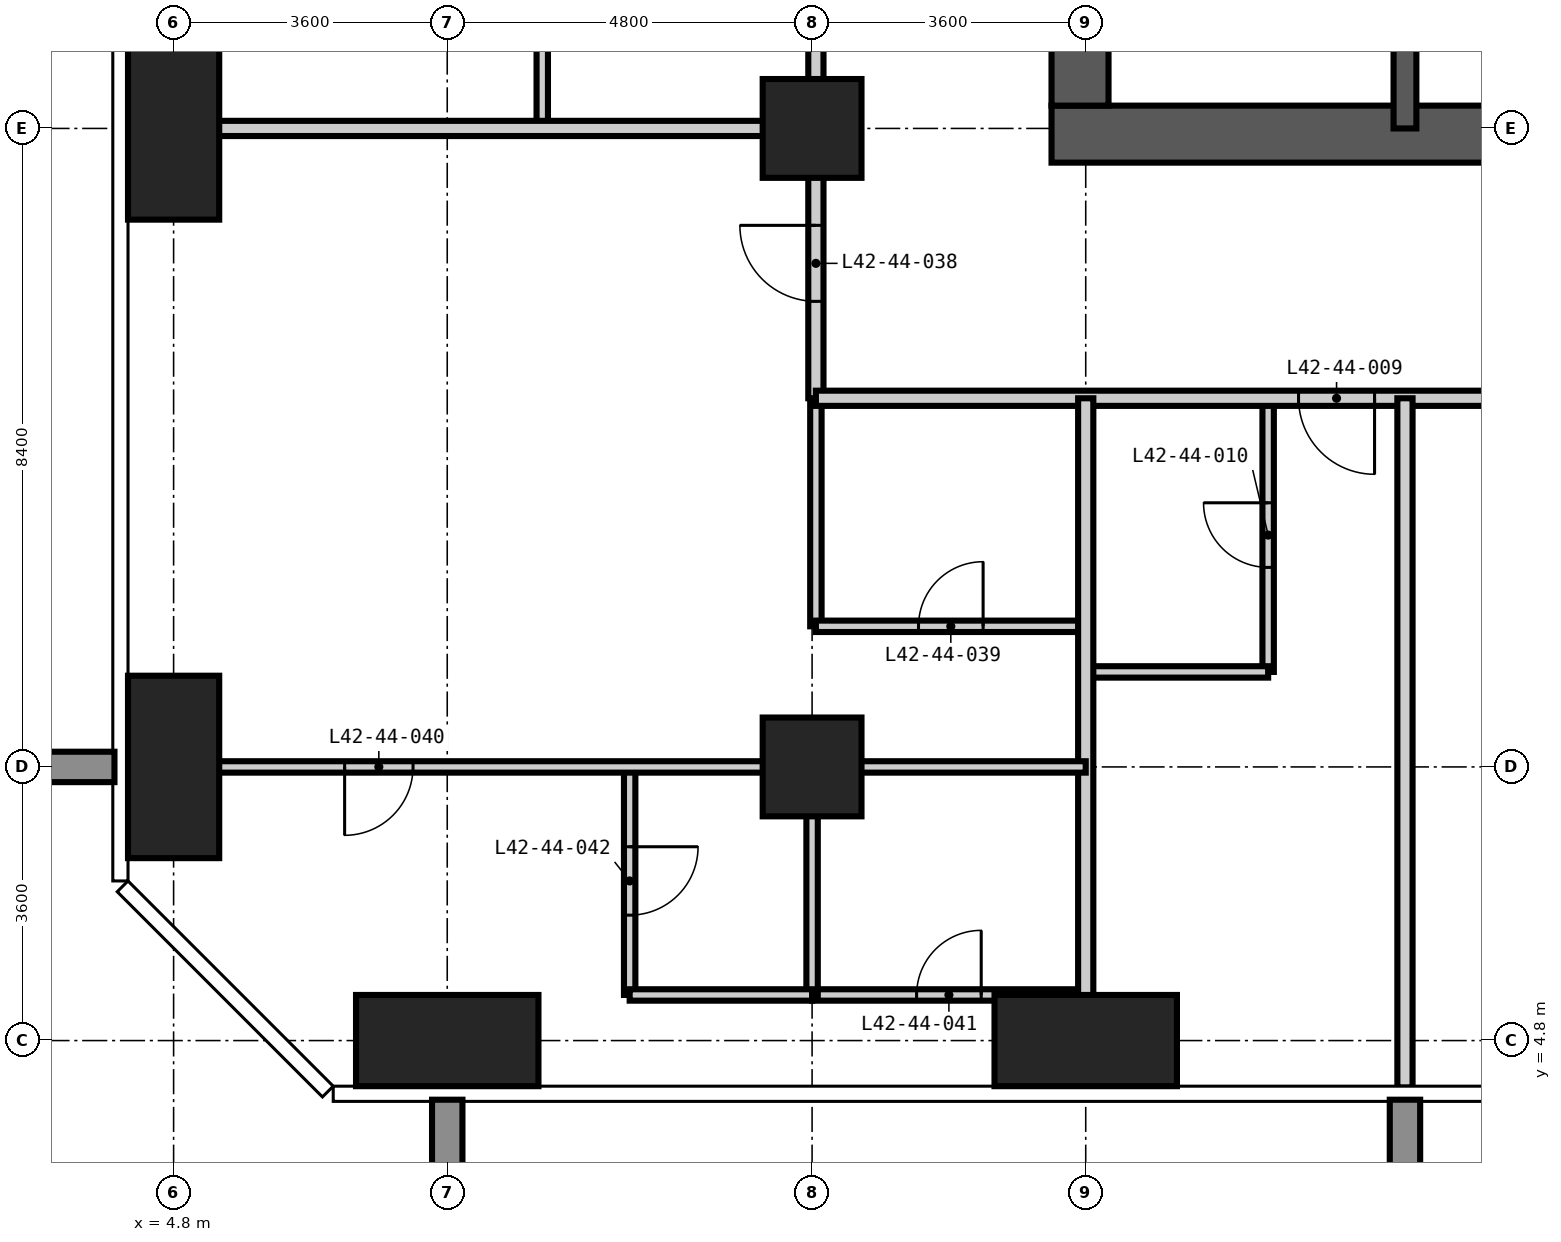
"""IFC4 building model, lengths in metres.
Left out: names, types, materials, properties, quantities, classifications, styles, units other than length and angle.
Written with IfcOpenShell. Run it as: python <this file> out.ifc"""

import sys

from ifc_helpers import new_model, si_unit, direction, frame, frame_2d, origin, origin_2d, place, context, subcontext, project, spatial, rectangle, extrude, element, fill, save


model = new_model("IFC4")
c1 = context("Model", 3, precision=1e-05, world=origin(), true_north=direction((0.0, 1.0)))
c2 = subcontext(c1, "Body", "Model", "MODEL_VIEW")
j1 = project(units=[si_unit("LENGTHUNIT", "METRE"), si_unit("PLANEANGLEUNIT", "RADIAN")], contexts=[c1])
p1 = place(None, origin())
s1 = spatial("IfcSite", under=j1, at=p1, CompositionType="ELEMENT")
p2 = place(p1, origin())
s2 = spatial("IfcBuilding", under=s1, at=p2, CompositionType="ELEMENT")
p3 = place(p2, frame((0.0, 0.0, 166.2)))
s3 = spatial("IfcBuildingStorey", under=s2, at=p3, CompositionType="ELEMENT", Elevation=166.2)
for number, where, z_axis, x_axis in (
    (1, (4.8, 8.4, -0.35), (0.0, 0.0, 1.0), (1.0, 0.0, 0.0)),
    (2, (4.8, 16.8, -0.35), (0.0, 0.0, 1.0), (1.0, 0.0, 0.0)),
):
    element("IfcColumn", number, at=place(p3, frame(where, z_axis=z_axis, x_axis=x_axis)), inside=s3, PredefinedType="COLUMN", context=c2, shape_type="SweptSolid", body=[
        extrude(rectangle(XDim=1.2, YDim=2.4, at=origin_2d()), origin(), (0.0, 0.0, 1.0), 3.6),
    ])
p4 = place(p3, frame((8.4, 4.8, -0.35), z_axis=(0.0, 0.0, 1.0), x_axis=(1.0, 0.0, 0.0)))
e3 = element("IfcColumn", 3, at=p4, inside=s3, PredefinedType="COLUMN", context=c2, shape_type="SweptSolid", body=[
    extrude(rectangle(XDim=2.4, YDim=1.2, at=origin_2d()), origin(), (0.0, 0.0, 1.0), 3.6),
])
for number, where, z_axis, x_axis in (
    (4, (13.2, 8.4, -0.35), (0.0, 0.0, 1.0), (1.0, 0.0, 0.0)),
    (5, (13.2, 16.8, -0.35), (0.0, 0.0, 1.0), (1.0, 0.0, 0.0)),
):
    element("IfcColumn", number, at=place(p3, frame(where, z_axis=z_axis, x_axis=x_axis)), inside=s3, PredefinedType="COLUMN", context=c2, shape_type="SweptSolid", body=[
        extrude(rectangle(XDim=1.3, YDim=1.3, at=origin_2d()), origin(), (0.0, 0.0, 1.0), 3.6),
    ])
p5 = place(p3, frame((16.8, 4.8, -0.35), z_axis=(0.0, 0.0, 1.0), x_axis=(1.0, 0.0, 0.0)))
e6 = element("IfcColumn", 6, at=p5, inside=s3, PredefinedType="COLUMN", context=c2, shape_type="SweptSolid", body=[
    extrude(rectangle(XDim=2.4, YDim=1.2, at=origin_2d()), origin(), (0.0, 0.0, 1.0), 3.6),
])
p6 = place(p3, frame((16.35, 16.725, -0.35), z_axis=(0.0, 0.0, 1.0), x_axis=(1.0, 0.0, 0.0)))
e7 = element("IfcWall", 7, at=p6, inside=s3, PredefinedType="SHEAR", context=c2, shape_type="SweptSolid", body=[
    extrude(rectangle(XDim=26.1, YDim=0.75, at=frame_2d((13.05, 0.0))), origin(), (0.0, 0.0, 1.0), 3.6),
])
p7 = place(p6, frame((12.55, 0.0, 0.35)))
e8 = element("IfcOpeningElement", 8, at=p7, cuts=e7, PredefinedType="OPENING", context=c2, shape_type="SweptSolid", body=[
    extrude(rectangle(XDim=1.0, YDim=2.1, at=frame_2d((0.5, 1.05))), frame((0.0, 0.385, 0.0), z_axis=(0.0, -1.0, 0.0), x_axis=(1.0, 0.0, 0.0)), (0.0, 0.0, 1.0), 0.77),
])
p8 = place(p6, frame((18.85, 0.0, 0.35)))
e9 = element("IfcOpeningElement", 9, at=p8, cuts=e7, PredefinedType="OPENING", context=c2, shape_type="SweptSolid", body=[
    extrude(rectangle(XDim=1.0, YDim=2.1, at=frame_2d((0.5, 1.05))), frame((0.0, 0.385, 0.0), z_axis=(0.0, -1.0, 0.0), x_axis=(1.0, 0.0, 0.0)), (0.0, 0.0, 1.0), 0.77),
])
p9 = place(p3, frame((16.725, 41.7, -0.35), z_axis=(0.0, 0.0, 1.0), x_axis=(0.0, -1.0, 0.0)))
e10 = element("IfcWall", 10, at=p9, inside=s3, PredefinedType="SHEAR", context=c2, shape_type="SweptSolid", body=[
    extrude(rectangle(XDim=24.6, YDim=0.75, at=frame_2d((12.3, 0.0))), origin(), (0.0, 0.0, 1.0), 3.6),
])
p10 = place(p9, frame((11.4, 0.0, 0.35)))
e11 = element("IfcOpeningElement", 11, at=p10, cuts=e10, PredefinedType="OPENING", context=c2, shape_type="SweptSolid", body=[
    extrude(rectangle(XDim=1.8, YDim=2.2, at=frame_2d((0.9, 1.1))), frame((0.0, 0.385, 0.0), z_axis=(0.0, -1.0, 0.0), x_axis=(1.0, 0.0, 0.0)), (0.0, 0.0, 1.0), 0.77),
])
p11 = place(p9, frame((20.2, 0.0, 0.35)))
e12 = element("IfcOpeningElement", 12, at=p11, cuts=e10, PredefinedType="OPENING", context=c2, shape_type="SweptSolid", body=[
    extrude(rectangle(XDim=1.0, YDim=2.1, at=frame_2d((0.5, 1.05))), frame((0.0, 0.385, 0.0), z_axis=(0.0, -1.0, 0.0), x_axis=(1.0, 0.0, 0.0)), (0.0, 0.0, 1.0), 0.77),
])
p12 = place(p9, frame((5.5, 0.0, 0.35)))
e13 = element("IfcOpeningElement", 13, at=p12, cuts=e10, PredefinedType="OPENING", context=c2, shape_type="SweptSolid", body=[
    extrude(rectangle(XDim=1.0, YDim=2.1, at=frame_2d((0.5, 1.05))), frame((0.0, 0.385, 0.0), z_axis=(0.0, -1.0, 0.0), x_axis=(1.0, 0.0, 0.0)), (0.0, 0.0, 1.0), 0.77),
])
p13 = place(p3, frame((21.0, 16.8, -0.35), z_axis=(0.0, 0.0, 1.0), x_axis=(0.0, 1.0, 0.0)))
e14 = element("IfcWall", 14, at=p13, inside=s3, PredefinedType="SHEAR", context=c2, shape_type="SweptSolid", body=[
    extrude(rectangle(XDim=2.8, YDim=0.3, at=frame_2d((1.4, 0.0))), origin(), (0.0, 0.0, 1.0), 3.6),
])
p14 = place(p3, frame((9.65, 16.8, 0.0), z_axis=(0.0, 0.0, 1.0), x_axis=(0.0, 1.0, 0.0)))
e15 = element("IfcWall", 15, at=p14, inside=s3, PredefinedType="PARTITIONING", context=c2, shape_type="SweptSolid", body=[
    extrude(rectangle(XDim=2.4, YDim=0.15, at=frame_2d((1.2, 0.0))), origin(), (0.0, 0.0, 1.0), 3.25),
])
p15 = place(p3, frame((13.25, 10.25, 0.0), z_axis=(0.0, 0.0, 1.0), x_axis=(0.0, 1.0, 0.0)))
e16 = element("IfcWall", 16, at=p15, inside=s3, PredefinedType="PARTITIONING", context=c2, shape_type="SweptSolid", body=[
    extrude(rectangle(XDim=3.0, YDim=0.15, at=frame_2d((1.5, 0.0))), origin(), (0.0, 0.0, 1.0), 3.25),
])
p16 = place(p3, frame((19.2, 9.65, 0.0), z_axis=(0.0, 0.0, 1.0), x_axis=(0.0, 1.0, 0.0)))
e17 = element("IfcWall", 17, at=p16, inside=s3, PredefinedType="PARTITIONING", context=c2, shape_type="SweptSolid", body=[
    extrude(rectangle(XDim=3.6, YDim=0.15, at=frame_2d((1.8, 0.0))), origin(), (0.0, 0.0, 1.0), 3.25),
])
p17 = place(p16, frame((1.375, 0.0, 0.0)))
e18 = element("IfcOpeningElement", 18, at=p17, cuts=e17, PredefinedType="OPENING", context=c2, shape_type="SweptSolid", body=[
    extrude(rectangle(XDim=0.85, YDim=2.1, at=frame_2d((0.425, 1.05))), frame((0.0, 0.085, 0.0), z_axis=(0.0, -1.0, 0.0), x_axis=(1.0, 0.0, 0.0)), (0.0, 0.0, 1.0), 0.17),
])
p18 = place(p3, frame((13.2, 5.4, 0.0), z_axis=(0.0, 0.0, 1.0), x_axis=(1.0, 0.0, 0.0)))
e19 = element("IfcWall", 19, at=p18, inside=s3, PredefinedType="PARTITIONING", context=c2, shape_type="SweptSolid", body=[
    extrude(rectangle(XDim=3.6, YDim=0.15, at=frame_2d((1.8, 0.0))), origin(), (0.0, 0.0, 1.0), 3.25),
])
p19 = place(p18, frame((1.375, 0.0, 0.0)))
e20 = element("IfcOpeningElement", 20, at=p19, cuts=e19, PredefinedType="OPENING", context=c2, shape_type="SweptSolid", body=[
    extrude(rectangle(XDim=0.85, YDim=2.1, at=frame_2d((0.425, 1.05))), frame((0.0, 0.085, 0.0), z_axis=(0.0, -1.0, 0.0), x_axis=(1.0, 0.0, 0.0)), (0.0, 0.0, 1.0), 0.17),
])
p20 = place(p3, frame((16.8, 9.65, 0.0), z_axis=(0.0, 0.0, 1.0), x_axis=(1.0, 0.0, 0.0)))
e21 = element("IfcWall", 21, at=p20, inside=s3, PredefinedType="PARTITIONING", context=c2, shape_type="SweptSolid", body=[
    extrude(rectangle(XDim=2.4, YDim=0.15, at=frame_2d((1.2, 0.0))), origin(), (0.0, 0.0, 1.0), 3.25),
])
p21 = place(p3, frame((13.25, 10.25, 0.0), z_axis=(0.0, 0.0, 1.0), x_axis=(1.0, 0.0, 0.0)))
e22 = element("IfcWall", 22, at=p21, inside=s3, PredefinedType="PARTITIONING", context=c2, shape_type="SweptSolid", body=[
    extrude(rectangle(XDim=3.55, YDim=0.15, at=frame_2d((1.775, 0.0))), origin(), (0.0, 0.0, 1.0), 3.25),
])
p22 = place(p21, frame((1.35, 0.0, 0.0)))
e23 = element("IfcOpeningElement", 23, at=p22, cuts=e22, PredefinedType="OPENING", context=c2, shape_type="SweptSolid", body=[
    extrude(rectangle(XDim=0.85, YDim=2.1, at=frame_2d((0.425, 1.05))), frame((0.0, 0.085, 0.0), z_axis=(0.0, -1.0, 0.0), x_axis=(1.0, 0.0, 0.0)), (0.0, 0.0, 1.0), 0.17),
])
p23 = place(p3, frame((13.25, 13.25, 0.0), z_axis=(0.0, 0.0, 1.0), x_axis=(0.0, 1.0, 0.0)))
e24 = element("IfcWall", 24, at=p23, inside=s3, PredefinedType="PARTITIONING", context=c2, shape_type="SweptSolid", body=[
    extrude(rectangle(XDim=31.7, YDim=0.2, at=frame_2d((15.85, 0.0))), origin(), (0.0, 0.0, 1.0), 3.25),
])
p24 = place(p23, frame((6.35, 0.0, 0.0)))
e25 = element("IfcOpeningElement", 25, at=p24, cuts=e24, PredefinedType="OPENING", context=c2, shape_type="SweptSolid", body=[
    extrude(rectangle(XDim=1.0, YDim=2.2, at=frame_2d((0.5, 1.1))), frame((0.0, 0.11, 0.0), z_axis=(0.0, -1.0, 0.0), x_axis=(1.0, 0.0, 0.0)), (0.0, 0.0, 1.0), 0.22),
])
p25 = place(p23, frame((8.15, 0.0, 0.0)))
e26 = element("IfcOpeningElement", 26, at=p25, cuts=e24, PredefinedType="OPENING", context=c2, shape_type="SweptSolid", body=[
    extrude(rectangle(XDim=1.0, YDim=2.2, at=frame_2d((0.5, 1.1))), frame((0.0, 0.11, 0.0), z_axis=(0.0, -1.0, 0.0), x_axis=(1.0, 0.0, 0.0)), (0.0, 0.0, 1.0), 0.22),
])
p26 = place(p23, frame((14.75, 0.0, 0.0)))
e27 = element("IfcOpeningElement", 27, at=p26, cuts=e24, PredefinedType="OPENING", context=c2, shape_type="SweptSolid", body=[
    extrude(rectangle(XDim=1.0, YDim=2.2, at=frame_2d((0.5, 1.1))), frame((0.0, 0.11, 0.0), z_axis=(0.0, -1.0, 0.0), x_axis=(1.0, 0.0, 0.0)), (0.0, 0.0, 1.0), 0.22),
])
p27 = place(p23, frame((16.55, 0.0, 0.0)))
e28 = element("IfcOpeningElement", 28, at=p27, cuts=e24, PredefinedType="OPENING", context=c2, shape_type="SweptSolid", body=[
    extrude(rectangle(XDim=1.0, YDim=2.2, at=frame_2d((0.5, 1.1))), frame((0.0, 0.11, 0.0), z_axis=(0.0, -1.0, 0.0), x_axis=(1.0, 0.0, 0.0)), (0.0, 0.0, 1.0), 0.22),
])
p28 = place(p23, frame((23.15, 0.0, 0.0)))
e29 = element("IfcOpeningElement", 29, at=p28, cuts=e24, PredefinedType="OPENING", context=c2, shape_type="SweptSolid", body=[
    extrude(rectangle(XDim=1.0, YDim=2.2, at=frame_2d((0.5, 1.1))), frame((0.0, 0.11, 0.0), z_axis=(0.0, -1.0, 0.0), x_axis=(1.0, 0.0, 0.0)), (0.0, 0.0, 1.0), 0.22),
])
p29 = place(p23, frame((24.95, 0.0, 0.0)))
e30 = element("IfcOpeningElement", 30, at=p29, cuts=e24, PredefinedType="OPENING", context=c2, shape_type="SweptSolid", body=[
    extrude(rectangle(XDim=1.0, YDim=2.2, at=frame_2d((0.5, 1.1))), frame((0.0, 0.11, 0.0), z_axis=(0.0, -1.0, 0.0), x_axis=(1.0, 0.0, 0.0)), (0.0, 0.0, 1.0), 0.22),
])
p30 = place(p23, frame((1.275, 0.0, 0.0)))
e31 = element("IfcOpeningElement", 31, at=p30, cuts=e24, PredefinedType="OPENING", context=c2, shape_type="SweptSolid", body=[
    extrude(rectangle(XDim=1.0, YDim=2.2, at=frame_2d((0.5, 1.1))), frame((0.0, 0.11, 0.0), z_axis=(0.0, -1.0, 0.0), x_axis=(1.0, 0.0, 0.0)), (0.0, 0.0, 1.0), 0.22),
])
p31 = place(p23, frame((29.725, 0.0, 0.0)))
e32 = element("IfcOpeningElement", 32, at=p31, cuts=e24, PredefinedType="OPENING", context=c2, shape_type="SweptSolid", body=[
    extrude(rectangle(XDim=1.0, YDim=2.2, at=frame_2d((0.5, 1.1))), frame((0.0, 0.11, 0.0), z_axis=(0.0, -1.0, 0.0), x_axis=(1.0, 0.0, 0.0)), (0.0, 0.0, 1.0), 0.22),
])
p32 = place(p3, frame((44.35, 13.25, 0.0), z_axis=(0.0, 0.0, 1.0), x_axis=(-1.0, 0.0, 0.0)))
e33 = element("IfcWall", 33, at=p32, inside=s3, PredefinedType="PARTITIONING", context=c2, shape_type="SweptSolid", body=[
    extrude(rectangle(XDim=31.1, YDim=0.2, at=frame_2d((15.55, 0.0))), origin(), (0.0, 0.0, 1.0), 3.25),
])
p33 = place(p32, frame((23.75, 0.0, 0.0)))
e34 = element("IfcOpeningElement", 34, at=p33, cuts=e33, PredefinedType="OPENING", context=c2, shape_type="SweptSolid", body=[
    extrude(rectangle(XDim=1.0, YDim=2.2, at=frame_2d((0.5, 1.1))), frame((0.0, 0.11, 0.0), z_axis=(0.0, -1.0, 0.0), x_axis=(1.0, 0.0, 0.0)), (0.0, 0.0, 1.0), 0.22),
])
p34 = place(p32, frame((20.0, 0.0, 0.0)))
e35 = element("IfcOpeningElement", 35, at=p34, cuts=e33, PredefinedType="OPENING", context=c2, shape_type="SweptSolid", body=[
    extrude(rectangle(XDim=1.0, YDim=2.2, at=frame_2d((0.5, 1.1))), frame((0.0, 0.11, 0.0), z_axis=(0.0, -1.0, 0.0), x_axis=(1.0, 0.0, 0.0)), (0.0, 0.0, 1.0), 0.22),
])
p35 = place(p32, frame((8.9, 0.0, 0.0)))
e36 = element("IfcOpeningElement", 36, at=p35, cuts=e33, PredefinedType="OPENING", context=c2, shape_type="SweptSolid", body=[
    extrude(rectangle(XDim=1.0, YDim=2.2, at=frame_2d((0.5, 1.1))), frame((0.0, 0.11, 0.0), z_axis=(0.0, -1.0, 0.0), x_axis=(1.0, 0.0, 0.0)), (0.0, 0.0, 1.0), 0.22),
])
p36 = place(p32, frame((5.15, 0.0, 0.0)))
e37 = element("IfcOpeningElement", 37, at=p36, cuts=e33, PredefinedType="OPENING", context=c2, shape_type="SweptSolid", body=[
    extrude(rectangle(XDim=1.0, YDim=2.2, at=frame_2d((0.5, 1.1))), frame((0.0, 0.11, 0.0), z_axis=(0.0, -1.0, 0.0), x_axis=(1.0, 0.0, 0.0)), (0.0, 0.0, 1.0), 0.22),
])
for number, where, z_axis, x_axis in (
    (38, (16.8, 4.182, 0.0), (0.0, 0.0, 1.0), (0.0, 1.0, 0.0)),
    (39, (21.0, 4.182, 0.0), (0.0, 0.0, 1.0), (0.0, 1.0, 0.0)),
    (40, (4.182, 16.8, 0.0), (0.0, 0.0, 1.0), (1.0, 0.0, 0.0)),
):
    element("IfcWall", number, at=place(p3, frame(where, z_axis=z_axis, x_axis=x_axis)), inside=s3, PredefinedType="PARTITIONING", context=c2, shape_type="SweptSolid", body=[
        extrude(rectangle(XDim=9.068, YDim=0.2, at=frame_2d((4.534, 0.0))), origin(), (0.0, 0.0, 1.0), 3.25),
    ])
p37 = place(p3, frame((10.8, 5.4, 0.0), z_axis=(0.0, 0.0, 1.0), x_axis=(0.0, 1.0, 0.0)))
e41 = element("IfcWall", 41, at=p37, inside=s3, PredefinedType="PARTITIONING", context=c2, shape_type="SweptSolid", body=[
    extrude(rectangle(XDim=3.0, YDim=0.15, at=frame_2d((1.5, 0.0))), origin(), (0.0, 0.0, 1.0), 3.25),
])
p38 = place(p37, frame((1.05, 0.0, 0.0)))
e42 = element("IfcOpeningElement", 42, at=p38, cuts=e41, PredefinedType="OPENING", context=c2, shape_type="SweptSolid", body=[
    extrude(rectangle(XDim=0.9, YDim=2.1, at=frame_2d((0.45, 1.05))), frame((0.0, 0.085, 0.0), z_axis=(0.0, -1.0, 0.0), x_axis=(1.0, 0.0, 0.0)), (0.0, 0.0, 1.0), 0.17),
])
p39 = place(p3, frame((13.2, 5.4, 0.0), z_axis=(0.0, 0.0, 1.0), x_axis=(0.0, 1.0, 0.0)))
e43 = element("IfcWall", 43, at=p39, inside=s3, PredefinedType="PARTITIONING", context=c2, shape_type="SweptSolid", body=[
    extrude(rectangle(XDim=3.0, YDim=0.15, at=frame_2d((1.5, 0.0))), origin(), (0.0, 0.0, 1.0), 3.25),
])
p40 = place(p3, frame((10.8, 5.4, 0.0), z_axis=(0.0, 0.0, 1.0), x_axis=(1.0, 0.0, 0.0)))
e44 = element("IfcWall", 44, at=p40, inside=s3, PredefinedType="PARTITIONING", context=c2, shape_type="SweptSolid", body=[
    extrude(rectangle(XDim=2.4, YDim=0.15, at=frame_2d((1.2, 0.0))), origin(), (0.0, 0.0, 1.0), 3.25),
])
p41 = place(p3, frame((4.182, 8.4, 0.0), z_axis=(0.0, 0.0, 1.0), x_axis=(1.0, 0.0, 0.0)))
e45 = element("IfcWall", 45, at=p41, inside=s3, PredefinedType="PARTITIONING", context=c2, shape_type="SweptSolid", body=[
    extrude(rectangle(XDim=12.618, YDim=0.15, at=frame_2d((6.309, 0.0))), origin(), (0.0, 0.0, 1.0), 3.25),
])
p42 = place(p41, frame((2.868, 0.0, 0.0)))
e46 = element("IfcOpeningElement", 46, at=p42, cuts=e45, PredefinedType="OPENING", context=c2, shape_type="SweptSolid", body=[
    extrude(rectangle(XDim=0.9, YDim=2.1, at=frame_2d((0.45, 1.05))), frame((0.0, 0.085, 0.0), z_axis=(0.0, -1.0, 0.0), x_axis=(1.0, 0.0, 0.0)), (0.0, 0.0, 1.0), 0.17),
])
p43 = place(p33, origin())
e47 = element("IfcDoor", 47, at=p43, inside=s3, OperationType="SINGLE_SWING_LEFT", PredefinedType="DOOR", context=c2, shape_type="SweptSolid", body=[
    extrude(rectangle(XDim=1.0, YDim=2.2, at=frame_2d((0.5, 1.1))), frame((0.0, 0.025, 0.0), z_axis=(0.0, -1.0, 0.0), x_axis=(1.0, 0.0, 0.0)), (0.0, 0.0, 1.0), 0.05),
])
fill(e34, e47)
p44 = place(p17, origin())
e48 = element("IfcDoor", 48, at=p44, inside=s3, OperationType="SINGLE_SWING_RIGHT", PredefinedType="DOOR", context=c2, shape_type="SweptSolid", body=[
    extrude(rectangle(XDim=0.85, YDim=2.1, at=frame_2d((0.425, 1.05))), frame((0.0, 0.025, 0.0), z_axis=(0.0, -1.0, 0.0), x_axis=(1.0, 0.0, 0.0)), (0.0, 0.0, 1.0), 0.05),
])
fill(e18, e48)
p45 = place(p30, origin())
e49 = element("IfcDoor", 49, at=p45, inside=s3, OperationType="SINGLE_SWING_RIGHT", PredefinedType="DOOR", context=c2, shape_type="SweptSolid", body=[
    extrude(rectangle(XDim=1.0, YDim=2.2, at=frame_2d((0.5, 1.1))), frame((0.0, 0.025, 0.0), z_axis=(0.0, -1.0, 0.0), x_axis=(1.0, 0.0, 0.0)), (0.0, 0.0, 1.0), 0.05),
])
fill(e31, e49)
p46 = place(p22, origin())
e50 = element("IfcDoor", 50, at=p46, inside=s3, OperationType="SINGLE_SWING_RIGHT", PredefinedType="DOOR", context=c2, shape_type="SweptSolid", body=[
    extrude(rectangle(XDim=0.85, YDim=2.1, at=frame_2d((0.425, 1.05))), frame((0.0, 0.025, 0.0), z_axis=(0.0, -1.0, 0.0), x_axis=(1.0, 0.0, 0.0)), (0.0, 0.0, 1.0), 0.05),
])
fill(e23, e50)
p47 = place(p42, frame((0.9, 0.0, 0.0), z_axis=(0.0, 0.0, 1.0), x_axis=(-1.0, 0.0, 0.0)))
e51 = element("IfcDoor", 51, at=p47, inside=s3, OperationType="SINGLE_SWING_RIGHT", PredefinedType="DOOR", context=c2, shape_type="SweptSolid", body=[
    extrude(rectangle(XDim=0.9, YDim=2.1, at=frame_2d((0.45, 1.05))), frame((0.0, 0.025, 0.0), z_axis=(0.0, -1.0, 0.0), x_axis=(1.0, 0.0, 0.0)), (0.0, 0.0, 1.0), 0.05),
])
fill(e46, e51)
p48 = place(p19, origin())
e52 = element("IfcDoor", 52, at=p48, inside=s3, OperationType="SINGLE_SWING_RIGHT", PredefinedType="DOOR", context=c2, shape_type="SweptSolid", body=[
    extrude(rectangle(XDim=0.85, YDim=2.1, at=frame_2d((0.425, 1.05))), frame((0.0, 0.025, 0.0), z_axis=(0.0, -1.0, 0.0), x_axis=(1.0, 0.0, 0.0)), (0.0, 0.0, 1.0), 0.05),
])
fill(e20, e52)
p49 = place(p38, frame((0.9, 0.0, 0.0), z_axis=(0.0, 0.0, 1.0), x_axis=(-1.0, 0.0, 0.0)))
e53 = element("IfcDoor", 53, at=p49, inside=s3, OperationType="SINGLE_SWING_LEFT", PredefinedType="DOOR", context=c2, shape_type="SweptSolid", body=[
    extrude(rectangle(XDim=0.9, YDim=2.1, at=frame_2d((0.45, 1.05))), frame((0.0, 0.025, 0.0), z_axis=(0.0, -1.0, 0.0), x_axis=(1.0, 0.0, 0.0)), (0.0, 0.0, 1.0), 0.05),
])
fill(e42, e53)
save(model, sys.argv[1])
